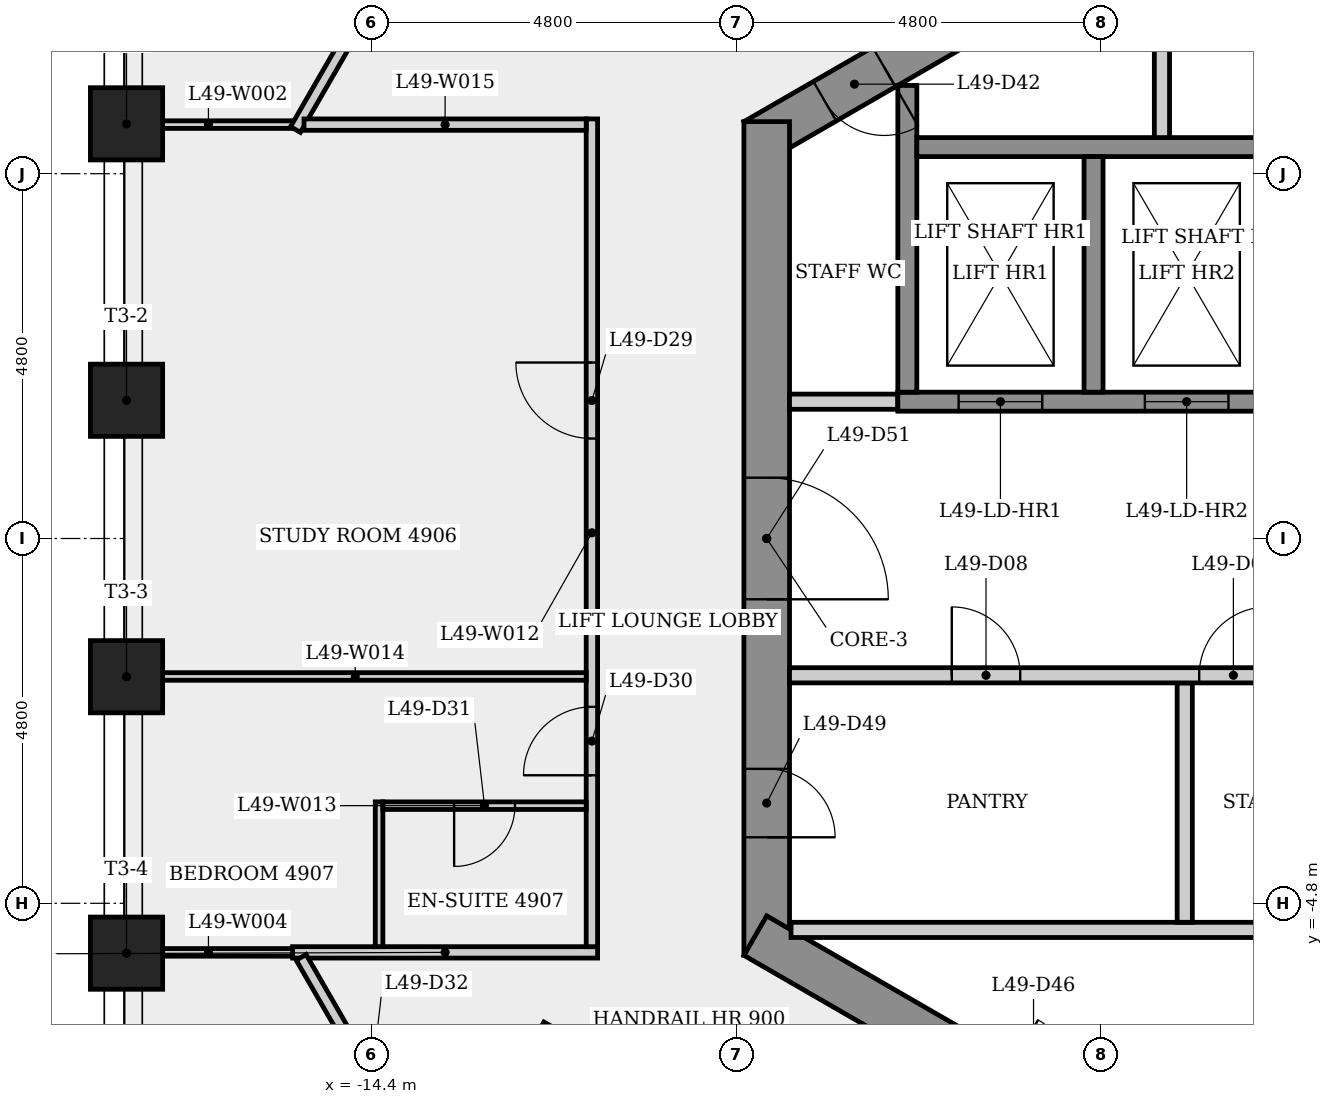
"""IFC4 building model, lengths in metres.
Left out: names, types, materials, properties, quantities, classifications, styles, units other than length and angle.
Written with IfcOpenShell. Run it as: python <this file> out.ifc"""

import sys

from ifc_helpers import new_model, si_unit, direction, frame, frame_2d, origin, origin_2d, place, context, subcontext, project, spatial, rectangle, extrude, element, fill, save


model = new_model("IFC4")
c1 = context("Model", 3, precision=1e-05, world=origin(), true_north=direction((0.0, 1.0)))
c2 = subcontext(c1, "Body", "Model", "MODEL_VIEW")
j1 = project(units=[si_unit("LENGTHUNIT", "METRE"), si_unit("PLANEANGLEUNIT", "RADIAN")], contexts=[c1])
p1 = place(None, origin())
s1 = spatial("IfcSite", under=j1, at=p1, CompositionType="ELEMENT")
p2 = place(p1, origin())
s2 = spatial("IfcBuilding", under=s1, at=p2, CompositionType="ELEMENT")
p3 = place(p2, frame((0.0, 0.0, 183.3)))
s3 = spatial("IfcBuildingStorey", under=s2, at=p3, CompositionType="ELEMENT", Elevation=183.3)
p4 = place(p3, frame((0.15, 10.71, 0.0), z_axis=(0.0, 0.0, 1.0), x_axis=(-0.866023993627, -0.500002442456, 0.0)))
e1 = element("IfcWall", 1, at=p4, inside=s3, PredefinedType="SHEAR", context=c2, shape_type="SweptSolid", body=[
    extrude(rectangle(XDim=10.97, YDim=0.6, at=frame_2d((5.485, 0.0))), origin(), (0.0, 0.0, 1.0), 3.4),
])
p5 = place(p4, frame((9.013, 0.0, 0.0)))
e2 = element("IfcOpeningElement", 2, at=p5, cuts=e1, PredefinedType="OPENING", context=c2, shape_type="SweptSolid", body=[
    extrude(rectangle(XDim=0.9, YDim=2.1, at=frame_2d((0.45, 1.05))), frame((0.0, 0.31, 0.0), z_axis=(0.0, -1.0, 0.0), x_axis=(1.0, 0.0, 0.0)), (0.0, 0.0, 1.0), 0.62),
])
p6 = place(p4, frame((2.437, 0.0, 0.0)))
e3 = element("IfcOpeningElement", 3, at=p6, cuts=e1, PredefinedType="OPENING", context=c2, shape_type="SweptSolid", body=[
    extrude(rectangle(XDim=0.9, YDim=2.1, at=frame_2d((0.45, 1.05))), frame((0.0, 0.31, 0.0), z_axis=(0.0, -1.0, 0.0), x_axis=(1.0, 0.0, 0.0)), (0.0, 0.0, 1.0), 0.62),
])
p7 = place(p3, frame((-9.2, 5.485, 0.0), z_axis=(0.0, 0.0, 1.0), x_axis=(0.0, -1.0, 0.0)))
e4 = element("IfcWall", 4, at=p7, inside=s3, PredefinedType="SHEAR", context=c2, shape_type="SweptSolid", body=[
    extrude(rectangle(XDim=10.97, YDim=0.6, at=frame_2d((5.485, 0.0))), origin(), (0.0, 0.0, 1.0), 3.4),
])
p8 = place(p7, frame((8.516, 0.0, 0.0)))
e5 = element("IfcOpeningElement", 5, at=p8, cuts=e4, PredefinedType="OPENING", context=c2, shape_type="SweptSolid", body=[
    extrude(rectangle(XDim=0.9, YDim=2.1, at=frame_2d((0.45, 1.05))), frame((0.0, 0.31, 0.0), z_axis=(0.0, -1.0, 0.0), x_axis=(1.0, 0.0, 0.0)), (0.0, 0.0, 1.0), 0.62),
])
p9 = place(p7, frame((4.685, 0.0, 0.0)))
e6 = element("IfcOpeningElement", 6, at=p9, cuts=e4, PredefinedType="OPENING", context=c2, shape_type="SweptSolid", body=[
    extrude(rectangle(XDim=1.6, YDim=2.1, at=frame_2d((0.8, 1.05))), frame((0.0, 0.31, 0.0), z_axis=(0.0, -1.0, 0.0), x_axis=(1.0, 0.0, 0.0)), (0.0, 0.0, 1.0), 0.62),
])
p10 = place(p3, frame((-9.35, -5.225, 0.0), z_axis=(0.0, 0.0, 1.0), x_axis=(0.866023993627, -0.500002442456, 0.0)))
e7 = element("IfcWall", 7, at=p10, inside=s3, PredefinedType="SHEAR", context=c2, shape_type="SweptSolid", body=[
    extrude(rectangle(XDim=10.97, YDim=0.6, at=frame_2d((5.485, 0.0))), origin(), (0.0, 0.0, 1.0), 3.4),
])
p11 = place(p10, frame((3.777, 0.0, 0.0)))
e8 = element("IfcOpeningElement", 8, at=p11, cuts=e7, PredefinedType="OPENING", context=c2, shape_type="SweptSolid", body=[
    extrude(rectangle(XDim=0.9, YDim=2.1, at=frame_2d((0.45, 1.05))), frame((0.0, 0.31, 0.0), z_axis=(0.0, -1.0, 0.0), x_axis=(1.0, 0.0, 0.0)), (0.0, 0.0, 1.0), 0.62),
])
p12 = place(p10, frame((8.903, 0.0, 0.0)))
e9 = element("IfcOpeningElement", 9, at=p12, cuts=e7, PredefinedType="OPENING", context=c2, shape_type="SweptSolid", body=[
    extrude(rectangle(XDim=0.9, YDim=2.1, at=frame_2d((0.45, 1.05))), frame((0.0, 0.31, 0.0), z_axis=(0.0, -1.0, 0.0), x_axis=(1.0, 0.0, 0.0)), (0.0, 0.0, 1.0), 0.62),
])
for number, where, z_axis, x_axis in (
    (10, (-17.623, 5.456, 0.0), (0.0, 0.0, 1.0), (-1.0, 0.0, 0.0)),
    (11, (-17.623, 1.819, 0.0), (0.0, 0.0, 1.0), (-1.0, 0.0, 0.0)),
    (12, (-17.623, -1.819, 0.0), (0.0, 0.0, 1.0), (-1.0, 0.0, 0.0)),
    (13, (-17.623, -5.456, 0.0), (0.0, 0.0, 1.0), (-1.0, 0.0, 0.0)),
):
    element("IfcColumn", number, at=place(p3, frame(where, z_axis=z_axis, x_axis=x_axis)), inside=s3, PredefinedType="COLUMN", context=c2, shape_type="SweptSolid", body=[
        extrude(rectangle(XDim=0.95, YDim=0.95, at=origin_2d()), origin(), (0.0, 0.0, 1.0), 3.4),
    ])
p13 = place(p3, frame((-15.438, -5.446, 0.0), z_axis=(0.0, 0.0, 1.0), x_axis=(1.0, 0.0, 0.0)))
e14 = element("IfcWall", 14, at=p13, inside=s3, PredefinedType="PARTITIONING", context=c2, shape_type="SweptSolid", body=[
    extrude(rectangle(XDim=4.013, YDim=0.15, at=frame_2d((2.007, 0.0))), origin(), (0.0, 0.0, 1.0), 3.0),
])
p14 = place(p3, frame((-15.438, 5.446, 0.0), z_axis=(0.0, 0.0, 1.0), x_axis=(-1.0, 0.0, 0.0)))
e15 = element("IfcWall", 15, at=p14, inside=s3, PredefinedType="PARTITIONING", context=c2, shape_type="SweptSolid", body=[
    extrude(rectangle(XDim=2.214, YDim=0.1, at=frame_2d((1.107, 0.0))), origin(), (0.0, 0.0, 1.0), 3.0),
])
p15 = place(p3, frame((-15.4, 5.381, 0.0), z_axis=(0.0, 0.0, 1.0), x_axis=(0.49997922879, 0.866037395716, 0.0)))
e16 = element("IfcWall", 16, at=p15, inside=s3, PredefinedType="PARTITIONING", context=c2, shape_type="SweptSolid", body=[
    extrude(rectangle(XDim=6.721, YDim=0.15, at=frame_2d((3.361, 0.0))), origin(), (0.0, 0.0, 1.0), 3.0),
])
p16 = place(p15, frame((2.861, 0.0, 0.0)))
e17 = element("IfcOpeningElement", 17, at=p16, cuts=e16, PredefinedType="OPENING", context=c2, shape_type="SweptSolid", body=[
    extrude(rectangle(XDim=1.0, YDim=2.1, at=frame_2d((0.5, 1.05))), frame((0.0, 0.085, 0.0), z_axis=(0.0, -1.0, 0.0), x_axis=(1.0, 0.0, 0.0)), (0.0, 0.0, 1.0), 0.17),
])
p17 = place(p3, frame((-15.438, -5.446, 0.0), z_axis=(0.0, 0.0, 1.0), x_axis=(-1.0, 0.0, 0.0)))
e18 = element("IfcWall", 18, at=p17, inside=s3, PredefinedType="PARTITIONING", context=c2, shape_type="SweptSolid", body=[
    extrude(rectangle(XDim=2.215, YDim=0.1, at=frame_2d((1.107, 0.0))), origin(), (0.0, 0.0, 1.0), 3.0),
])
p18 = place(p3, frame((-14.3, -3.465, 0.0), z_axis=(0.0, 0.0, 1.0), x_axis=(0.0, -1.0, 0.0)))
e19 = element("IfcWall", 19, at=p18, inside=s3, PredefinedType="PARTITIONING", context=c2, shape_type="SweptSolid", body=[
    extrude(rectangle(XDim=1.906, YDim=0.1, at=frame_2d((0.953, 0.0))), origin(), (0.0, 0.0, 1.0), 3.0),
])
p19 = place(p3, frame((-13.648, -9.239, 0.0), z_axis=(0.0, 0.0, 1.0), x_axis=(0.500017246033, 0.866015446554, 0.0)))
e20 = element("IfcWall", 20, at=p19, inside=s3, PredefinedType="SHEAR", context=c2, shape_type="SweptSolid", body=[
    extrude(rectangle(XDim=3.25, YDim=0.25, at=frame_2d((1.625, 0.0))), origin(), (0.0, 0.0, 1.0), 3.0),
])
p20 = place(p3, frame((-13.473, -8.719, 0.0), z_axis=(0.0, 0.0, 1.0), x_axis=(-0.500022870649, 0.866012199007, 0.0)))
e21 = element("IfcWall", 21, at=p20, inside=s3, PredefinedType="PARTITIONING", context=c2, shape_type="SweptSolid", body=[
    extrude(rectangle(XDim=3.705, YDim=0.15, at=frame_2d((1.853, 0.0))), origin(), (0.0, 0.0, 1.0), 3.0),
])
p21 = place(p20, frame((1.352, 0.0, 0.0)))
e22 = element("IfcOpeningElement", 22, at=p21, cuts=e21, PredefinedType="OPENING", context=c2, shape_type="SweptSolid", body=[
    extrude(rectangle(XDim=1.0, YDim=2.1, at=frame_2d((0.5, 1.05))), frame((0.0, 0.085, 0.0), z_axis=(0.0, -1.0, 0.0), x_axis=(1.0, 0.0, 0.0)), (0.0, 0.0, 1.0), 0.17),
])
p22 = place(p3, frame((-11.5, -5.371, 0.0), z_axis=(0.0, 0.0, 1.0), x_axis=(0.0, 1.0, 0.0)))
e23 = element("IfcWall", 23, at=p22, inside=s3, PredefinedType="PARTITIONING", context=c2, shape_type="SweptSolid", body=[
    extrude(rectangle(XDim=10.892, YDim=0.15, at=frame_2d((5.446, 0.0))), origin(), (0.0, 0.0, 1.0), 3.0),
])
p23 = place(p22, frame((6.686, 0.0, 0.0)))
e24 = element("IfcOpeningElement", 24, at=p23, cuts=e23, PredefinedType="OPENING", context=c2, shape_type="SweptSolid", body=[
    extrude(rectangle(XDim=1.0, YDim=2.1, at=frame_2d((0.5, 1.05))), frame((0.0, 0.085, 0.0), z_axis=(0.0, -1.0, 0.0), x_axis=(1.0, 0.0, 0.0)), (0.0, 0.0, 1.0), 0.17),
])
p24 = place(p22, frame((2.256, 0.0, 0.0)))
e25 = element("IfcOpeningElement", 25, at=p24, cuts=e23, PredefinedType="OPENING", context=c2, shape_type="SweptSolid", body=[
    extrude(rectangle(XDim=0.9, YDim=2.1, at=frame_2d((0.45, 1.05))), frame((0.0, 0.085, 0.0), z_axis=(0.0, -1.0, 0.0), x_axis=(1.0, 0.0, 0.0)), (0.0, 0.0, 1.0), 0.17),
])
p25 = place(p3, frame((-11.575, -3.515, 0.0), z_axis=(0.0, 0.0, 1.0), x_axis=(-1.0, 0.0, 0.0)))
e26 = element("IfcWall", 26, at=p25, inside=s3, PredefinedType="PARTITIONING", context=c2, shape_type="SweptSolid", body=[
    extrude(rectangle(XDim=2.675, YDim=0.1, at=frame_2d((1.337, 0.0))), origin(), (0.0, 0.0, 1.0), 3.0),
])
p26 = place(p25, frame((0.938, 0.0, 0.0)))
e27 = element("IfcOpeningElement", 27, at=p26, cuts=e26, PredefinedType="OPENING", context=c2, shape_type="SweptSolid", body=[
    extrude(rectangle(XDim=0.8, YDim=2.1, at=frame_2d((0.4, 1.05))), frame((0.0, 0.06, 0.0), z_axis=(0.0, -1.0, 0.0), x_axis=(1.0, 0.0, 0.0)), (0.0, 0.0, 1.0), 0.12),
])
p27 = place(p3, frame((-11.575, -1.815, 0.0), z_axis=(0.0, 0.0, 1.0), x_axis=(-1.0, 0.0, 0.0)))
e28 = element("IfcWall", 28, at=p27, inside=s3, PredefinedType="PARTITIONING", context=c2, shape_type="SweptSolid", body=[
    extrude(rectangle(XDim=6.077, YDim=0.1, at=frame_2d((3.039, 0.0))), origin(), (0.0, 0.0, 1.0), 3.0),
])
p28 = place(p3, frame((-11.575, 5.446, 0.0), z_axis=(0.0, 0.0, 1.0), x_axis=(-1.0, 0.0, 0.0)))
e29 = element("IfcWall", 29, at=p28, inside=s3, PredefinedType="PARTITIONING", context=c2, shape_type="SweptSolid", body=[
    extrude(rectangle(XDim=3.713, YDim=0.15, at=frame_2d((1.856, 0.0))), origin(), (0.0, 0.0, 1.0), 3.0),
])
p29 = place(p3, frame((-8.9, 1.8, 0.0), z_axis=(0.0, 0.0, 1.0), x_axis=(1.0, 0.0, 0.0)))
e30 = element("IfcWall", 30, at=p29, inside=s3, PredefinedType="PARTITIONING", context=c2, shape_type="SweptSolid", body=[
    extrude(rectangle(XDim=1.425, YDim=0.2, at=frame_2d((0.712, 0.0))), origin(), (0.0, 0.0, 1.0), 3.0),
])
p30 = place(p3, frame((-8.88, -5.15, 0.0), z_axis=(0.0, 0.0, 1.0), x_axis=(1.0, 0.0, 0.0)))
e31 = element("IfcWall", 31, at=p30, inside=s3, PredefinedType="PARTITIONING", context=c2, shape_type="SweptSolid", body=[
    extrude(rectangle(XDim=11.205, YDim=0.2, at=frame_2d((5.603, 0.0))), origin(), (0.0, 0.0, 1.0), 3.0),
])
p31 = place(p3, frame((-7.475, 1.8, 0.0), z_axis=(0.0, 0.0, 1.0), x_axis=(1.0, 0.0, 0.0)))
e32 = element("IfcWall", 32, at=p31, inside=s3, PredefinedType="SHEAR", context=c2, shape_type="SweptSolid", body=[
    extrude(rectangle(XDim=14.95, YDim=0.25, at=frame_2d((7.475, 0.0))), origin(), (0.0, 0.0, 1.0), 3.0),
])
p32 = place(p31, frame((0.8, 0.0, 0.0)))
e33 = element("IfcOpeningElement", 33, at=p32, cuts=e32, PredefinedType="OPENING", context=c2, shape_type="SweptSolid", body=[
    extrude(rectangle(XDim=1.1, YDim=2.1, at=frame_2d((0.55, 1.05))), frame((0.0, 0.135, 0.0), z_axis=(0.0, -1.0, 0.0), x_axis=(1.0, 0.0, 0.0)), (0.0, 0.0, 1.0), 0.27),
])
p33 = place(p31, frame((3.25, 0.0, 0.0)))
e34 = element("IfcOpeningElement", 34, at=p33, cuts=e32, PredefinedType="OPENING", context=c2, shape_type="SweptSolid", body=[
    extrude(rectangle(XDim=1.1, YDim=2.1, at=frame_2d((0.55, 1.05))), frame((0.0, 0.135, 0.0), z_axis=(0.0, -1.0, 0.0), x_axis=(1.0, 0.0, 0.0)), (0.0, 0.0, 1.0), 0.27),
])
p34 = place(p31, frame((5.7, 0.0, 0.0)))
e35 = element("IfcOpeningElement", 35, at=p34, cuts=e32, PredefinedType="OPENING", context=c2, shape_type="SweptSolid", body=[
    extrude(rectangle(XDim=1.1, YDim=2.1, at=frame_2d((0.55, 1.05))), frame((0.0, 0.135, 0.0), z_axis=(0.0, -1.0, 0.0), x_axis=(1.0, 0.0, 0.0)), (0.0, 0.0, 1.0), 0.27),
])
p35 = place(p31, frame((8.15, 0.0, 0.0)))
e36 = element("IfcOpeningElement", 36, at=p35, cuts=e32, PredefinedType="OPENING", context=c2, shape_type="SweptSolid", body=[
    extrude(rectangle(XDim=1.1, YDim=2.1, at=frame_2d((0.55, 1.05))), frame((0.0, 0.135, 0.0), z_axis=(0.0, -1.0, 0.0), x_axis=(1.0, 0.0, 0.0)), (0.0, 0.0, 1.0), 0.27),
])
p36 = place(p31, frame((10.6, 0.0, 0.0)))
e37 = element("IfcOpeningElement", 37, at=p36, cuts=e32, PredefinedType="OPENING", context=c2, shape_type="SweptSolid", body=[
    extrude(rectangle(XDim=1.1, YDim=2.1, at=frame_2d((0.55, 1.05))), frame((0.0, 0.135, 0.0), z_axis=(0.0, -1.0, 0.0), x_axis=(1.0, 0.0, 0.0)), (0.0, 0.0, 1.0), 0.27),
])
p37 = place(p31, frame((13.05, 0.0, 0.0)))
e38 = element("IfcOpeningElement", 38, at=p37, cuts=e32, PredefinedType="OPENING", context=c2, shape_type="SweptSolid", body=[
    extrude(rectangle(XDim=1.1, YDim=2.1, at=frame_2d((0.55, 1.05))), frame((0.0, 0.135, 0.0), z_axis=(0.0, -1.0, 0.0), x_axis=(1.0, 0.0, 0.0)), (0.0, 0.0, 1.0), 0.27),
])
p38 = place(p3, frame((-7.35, 1.925, 0.0), z_axis=(0.0, 0.0, 1.0), x_axis=(0.0, 1.0, 0.0)))
e39 = element("IfcWall", 39, at=p38, inside=s3, PredefinedType="SHEAR", context=c2, shape_type="SweptSolid", body=[
    extrude(rectangle(XDim=4.036, YDim=0.25, at=frame_2d((2.018, 0.0))), origin(), (0.0, 0.0, 1.0), 3.0),
])
p39 = place(p3, frame((-7.225, 5.15, 0.0), z_axis=(0.0, 0.0, 1.0), x_axis=(1.0, 0.0, 0.0)))
e40 = element("IfcWall", 40, at=p39, inside=s3, PredefinedType="SHEAR", context=c2, shape_type="SweptSolid", body=[
    extrude(rectangle(XDim=14.7, YDim=0.25, at=frame_2d((7.35, 0.0))), origin(), (0.0, 0.0, 1.0), 3.0),
])
p40 = place(p3, frame((-4.9, 5.025, 0.0), z_axis=(0.0, 0.0, 1.0), x_axis=(0.0, -1.0, 0.0)))
e41 = element("IfcWall", 41, at=p40, inside=s3, PredefinedType="SHEAR", context=c2, shape_type="SweptSolid", body=[
    extrude(rectangle(XDim=3.1, YDim=0.25, at=frame_2d((1.55, 0.0))), origin(), (0.0, 0.0, 1.0), 3.4),
])
p41 = place(p3, frame((-4.0, 7.967, 0.0), z_axis=(0.0, 0.0, 1.0), x_axis=(0.0, -1.0, 0.0)))
e42 = element("IfcWall", 42, at=p41, inside=s3, PredefinedType="PARTITIONING", context=c2, shape_type="SweptSolid", body=[
    extrude(rectangle(XDim=2.692, YDim=0.2, at=frame_2d((1.346, 0.0))), origin(), (0.0, 0.0, 1.0), 3.0),
])
p42 = place(p3, frame((-3.7, -1.9, 0.0), z_axis=(0.0, 0.0, 1.0), x_axis=(0.0, -1.0, 0.0)))
e43 = element("IfcWall", 43, at=p42, inside=s3, PredefinedType="PARTITIONING", context=c2, shape_type="SweptSolid", body=[
    extrude(rectangle(XDim=3.15, YDim=0.2, at=frame_2d((1.575, 0.0))), origin(), (0.0, 0.0, 1.0), 3.0),
])
p43 = place(p3, frame((-8.9, -1.8, 0.0), z_axis=(0.0, 0.0, 1.0), x_axis=(1.0, 0.0, 0.0)))
e44 = element("IfcWall", 44, at=p43, inside=s3, PredefinedType="PARTITIONING", context=c2, shape_type="SweptSolid", body=[
    extrude(rectangle(XDim=11.225, YDim=0.2, at=frame_2d((5.613, 0.0))), origin(), (0.0, 0.0, 1.0), 3.0),
])
p44 = place(p43, frame((2.135, 0.0, 0.0)))
e45 = element("IfcOpeningElement", 45, at=p44, cuts=e44, PredefinedType="OPENING", context=c2, shape_type="SweptSolid", body=[
    extrude(rectangle(XDim=0.9, YDim=2.1, at=frame_2d((0.45, 1.05))), frame((0.0, 0.11, 0.0), z_axis=(0.0, -1.0, 0.0), x_axis=(1.0, 0.0, 0.0)), (0.0, 0.0, 1.0), 0.22),
])
p45 = place(p43, frame((5.39, 0.0, 0.0)))
e46 = element("IfcOpeningElement", 46, at=p45, cuts=e44, PredefinedType="OPENING", context=c2, shape_type="SweptSolid", body=[
    extrude(rectangle(XDim=0.9, YDim=2.1, at=frame_2d((0.45, 1.05))), frame((0.0, 0.11, 0.0), z_axis=(0.0, -1.0, 0.0), x_axis=(1.0, 0.0, 0.0)), (0.0, 0.0, 1.0), 0.22),
])
p46 = place(p43, frame((9.613, 0.0, 0.0)))
e47 = element("IfcOpeningElement", 47, at=p46, cuts=e44, PredefinedType="OPENING", context=c2, shape_type="SweptSolid", body=[
    extrude(rectangle(XDim=0.9, YDim=2.1, at=frame_2d((0.45, 1.05))), frame((0.0, 0.11, 0.0), z_axis=(0.0, -1.0, 0.0), x_axis=(1.0, 0.0, 0.0)), (0.0, 0.0, 1.0), 0.22),
])
p47 = place(p32, origin())
e48 = element("IfcDoor", 48, at=p47, inside=s3, OperationType="SLIDING_TO_LEFT", PredefinedType="DOOR", context=c2, shape_type="SweptSolid", body=[
    extrude(rectangle(XDim=1.1, YDim=2.1, at=frame_2d((0.55, 1.05))), frame((0.0, 0.025, 0.0), z_axis=(0.0, -1.0, 0.0), x_axis=(1.0, 0.0, 0.0)), (0.0, 0.0, 1.0), 0.05),
])
fill(e33, e48)
p48 = place(p33, origin())
e49 = element("IfcDoor", 49, at=p48, inside=s3, OperationType="SLIDING_TO_LEFT", PredefinedType="DOOR", context=c2, shape_type="SweptSolid", body=[
    extrude(rectangle(XDim=1.1, YDim=2.1, at=frame_2d((0.55, 1.05))), frame((0.0, 0.025, 0.0), z_axis=(0.0, -1.0, 0.0), x_axis=(1.0, 0.0, 0.0)), (0.0, 0.0, 1.0), 0.05),
])
fill(e34, e49)
p49 = place(p44, origin())
e50 = element("IfcDoor", 50, at=p49, inside=s3, OperationType="SINGLE_SWING_LEFT", PredefinedType="DOOR", context=c2, shape_type="SweptSolid", body=[
    extrude(rectangle(XDim=0.9, YDim=2.1, at=frame_2d((0.45, 1.05))), frame((0.0, 0.025, 0.0), z_axis=(0.0, -1.0, 0.0), x_axis=(1.0, 0.0, 0.0)), (0.0, 0.0, 1.0), 0.05),
])
fill(e45, e50)
p50 = place(p45, origin())
e51 = element("IfcDoor", 51, at=p50, inside=s3, OperationType="SINGLE_SWING_RIGHT", PredefinedType="DOOR", context=c2, shape_type="SweptSolid", body=[
    extrude(rectangle(XDim=0.9, YDim=2.1, at=frame_2d((0.45, 1.05))), frame((0.0, 0.025, 0.0), z_axis=(0.0, -1.0, 0.0), x_axis=(1.0, 0.0, 0.0)), (0.0, 0.0, 1.0), 0.05),
])
fill(e46, e51)
p51 = place(p23, origin())
e52 = element("IfcDoor", 52, at=p51, inside=s3, OperationType="SINGLE_SWING_RIGHT", PredefinedType="DOOR", context=c2, shape_type="SweptSolid", body=[
    extrude(rectangle(XDim=1.0, YDim=2.1, at=frame_2d((0.5, 1.05))), frame((0.0, 0.025, 0.0), z_axis=(0.0, -1.0, 0.0), x_axis=(1.0, 0.0, 0.0)), (0.0, 0.0, 1.0), 0.05),
])
fill(e24, e52)
p52 = place(p24, origin())
e53 = element("IfcDoor", 53, at=p52, inside=s3, OperationType="SINGLE_SWING_LEFT", PredefinedType="DOOR", context=c2, shape_type="SweptSolid", body=[
    extrude(rectangle(XDim=0.9, YDim=2.1, at=frame_2d((0.45, 1.05))), frame((0.0, 0.025, 0.0), z_axis=(0.0, -1.0, 0.0), x_axis=(1.0, 0.0, 0.0)), (0.0, 0.0, 1.0), 0.05),
])
fill(e25, e53)
p53 = place(p26, origin())
e54 = element("IfcDoor", 54, at=p53, inside=s3, OperationType="SINGLE_SWING_RIGHT", PredefinedType="DOOR", context=c2, shape_type="SweptSolid", body=[
    extrude(rectangle(XDim=0.8, YDim=2.1, at=frame_2d((0.4, 1.05))), frame((0.0, 0.025, 0.0), z_axis=(0.0, -1.0, 0.0), x_axis=(1.0, 0.0, 0.0)), (0.0, 0.0, 1.0), 0.05),
])
fill(e27, e54)
p54 = place(p5, origin())
e55 = element("IfcDoor", 55, at=p54, inside=s3, OperationType="SINGLE_SWING_LEFT", PredefinedType="DOOR", context=c2, shape_type="SweptSolid", body=[
    extrude(rectangle(XDim=0.9, YDim=2.1, at=frame_2d((0.45, 1.05))), frame((0.0, 0.025, 0.0), z_axis=(0.0, -1.0, 0.0), x_axis=(1.0, 0.0, 0.0)), (0.0, 0.0, 1.0), 0.05),
])
fill(e2, e55)
p55 = place(p8, origin())
e56 = element("IfcDoor", 56, at=p55, inside=s3, OperationType="SINGLE_SWING_RIGHT", PredefinedType="DOOR", context=c2, shape_type="SweptSolid", body=[
    extrude(rectangle(XDim=0.9, YDim=2.1, at=frame_2d((0.45, 1.05))), frame((0.0, 0.025, 0.0), z_axis=(0.0, -1.0, 0.0), x_axis=(1.0, 0.0, 0.0)), (0.0, 0.0, 1.0), 0.05),
])
fill(e5, e56)
p56 = place(p9, origin())
e57 = element("IfcDoor", 57, at=p56, inside=s3, OperationType="SINGLE_SWING_RIGHT", PredefinedType="DOOR", context=c2, shape_type="SweptSolid", body=[
    extrude(rectangle(XDim=1.6, YDim=2.1, at=frame_2d((0.8, 1.05))), frame((0.0, 0.025, 0.0), z_axis=(0.0, -1.0, 0.0), x_axis=(1.0, 0.0, 0.0)), (0.0, 0.0, 1.0), 0.05),
])
fill(e6, e57)
save(model, sys.argv[1])
